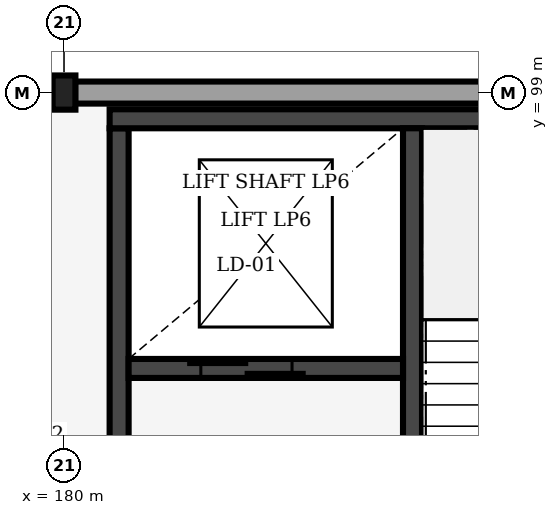
"""IFC4 building model, lengths in metres.
Left out: names, types, materials, properties, quantities, classifications, styles, units other than length and angle.
Written with IfcOpenShell. Run it as: python <this file> out.ifc"""

import sys

from ifc_helpers import new_model, si_unit, direction, frame, frame_2d, origin, origin_2d, place, context, subcontext, project, spatial, rectangle, i_section, extrude, element, fill, save


model = new_model("IFC4")
c1 = context("Model", 3, precision=1e-05, world=origin(), true_north=direction((0.0, 1.0)))
c2 = subcontext(c1, "Body", "Model", "MODEL_VIEW")
j1 = project(units=[si_unit("LENGTHUNIT", "METRE"), si_unit("PLANEANGLEUNIT", "RADIAN")], contexts=[c1])
p1 = place(None, origin())
s1 = spatial("IfcSite", under=j1, at=p1, CompositionType="ELEMENT")
p2 = place(p1, origin())
s2 = spatial("IfcBuilding", under=s1, at=p2, CompositionType="ELEMENT")
p3 = place(p2, frame((0.0, 0.0, 18.0)))
s3 = spatial("IfcBuildingStorey", under=s2, at=p3, CompositionType="ELEMENT", Elevation=18.0)
p4 = place(p3, frame((180.0, 99.0, 0.0), z_axis=(0.0, 0.0, 1.0), x_axis=(1.0, 0.0, 0.0)))
e1 = element("IfcColumn", 1, at=p4, inside=s3, PredefinedType="COLUMN", context=c2, shape_type="SweptSolid", body=[
    extrude(i_section(OverallWidth=0.3, OverallDepth=0.45, WebThickness=0.014, FlangeThickness=0.026, FilletRadius=0.027, at=origin_2d()), origin(), (0.0, 0.0, 1.0), 4.8),
])
p5 = place(p3, frame((180.145, 99.0, 0.0), z_axis=(0.0, 0.0, 1.0), x_axis=(1.0, 0.0, 0.0)))
e2 = element("IfcWall", 2, at=p5, inside=s3, PredefinedType="SOLIDWALL", context=c2, shape_type="SweptSolid", body=[
    extrude(rectangle(XDim=11.71, YDim=0.29, at=frame_2d((5.855, 0.0))), origin(), (0.0, 0.0, 1.0), 3.65),
])
p6 = place(p3, frame((180.725, 90.47, 0.0), z_axis=(0.0, 0.0, 1.0), x_axis=(0.0, 1.0, 0.0)))
e3 = element("IfcWall", 3, at=p6, inside=s3, PredefinedType="SHEAR", context=c2, shape_type="SweptSolid", body=[
    extrude(rectangle(XDim=8.06, YDim=0.25, at=frame_2d((4.03, 0.0))), origin(), (0.0, 0.0, 1.0), 4.44),
])
p7 = place(p6, frame((1.15, 0.0, 0.0)))
e4 = element("IfcOpeningElement", 4, at=p7, cuts=e3, PredefinedType="OPENING", context=c2, shape_type="SweptSolid", body=[
    extrude(rectangle(XDim=1.6, YDim=2.2, at=frame_2d((0.8, 1.1))), frame((0.0, 0.135, 0.0), z_axis=(0.0, -1.0, 0.0), x_axis=(1.0, 0.0, 0.0)), (0.0, 0.0, 1.0), 0.27),
])
p8 = place(p3, frame((180.6, 98.655, 0.0), z_axis=(0.0, 0.0, 1.0), x_axis=(1.0, 0.0, 0.0)))
e5 = element("IfcWall", 5, at=p8, inside=s3, PredefinedType="SHEAR", context=c2, shape_type="SweptSolid", body=[
    extrude(rectangle(XDim=7.8, YDim=0.25, at=frame_2d((3.9, 0.0))), origin(), (0.0, 0.0, 1.0), 4.44),
])
p9 = place(p3, frame((184.585, 90.47, 0.0), z_axis=(0.0, 0.0, 1.0), x_axis=(0.0, 1.0, 0.0)))
e6 = element("IfcWall", 6, at=p9, inside=s3, PredefinedType="SHEAR", context=c2, shape_type="SweptSolid", body=[
    extrude(rectangle(XDim=8.06, YDim=0.25, at=frame_2d((4.03, 0.0))), origin(), (0.0, 0.0, 1.0), 4.44),
])
p10 = place(p9, frame((0.25, 0.0, 0.0)))
e7 = element("IfcOpeningElement", 7, at=p10, cuts=e6, PredefinedType="OPENING", context=c2, shape_type="SweptSolid", body=[
    extrude(rectangle(XDim=1.15, YDim=2.15, at=frame_2d((0.575, 1.075))), frame((0.0, 0.135, 0.0), z_axis=(0.0, -1.0, 0.0), x_axis=(1.0, 0.0, 0.0)), (0.0, 0.0, 1.0), 0.27),
])
p11 = place(p3, frame((180.85, 95.37, 0.0), z_axis=(0.0, 0.0, 1.0), x_axis=(1.0, 0.0, 0.0)))
e8 = element("IfcWall", 8, at=p11, inside=s3, PredefinedType="SHEAR", context=c2, shape_type="SweptSolid", body=[
    extrude(rectangle(XDim=3.61, YDim=0.25, at=frame_2d((1.805, 0.0))), origin(), (0.0, 0.0, 1.0), 4.44),
])
p12 = place(p11, frame((0.95, 0.0, 0.0)))
e9 = element("IfcOpeningElement", 9, at=p12, cuts=e8, PredefinedType="OPENING", context=c2, shape_type="SweptSolid", body=[
    extrude(rectangle(XDim=1.2, YDim=2.2, at=frame_2d((0.6, 1.1))), frame((0.0, 0.135, 0.0), z_axis=(0.0, -1.0, 0.0), x_axis=(1.0, 0.0, 0.0)), (0.0, 0.0, 1.0), 0.27),
])
p13 = place(p12, origin())
e10 = element("IfcDoor", 10, at=p13, inside=s3, OperationType="DOUBLE_DOOR_SLIDING", PredefinedType="DOOR", context=c2, shape_type="SweptSolid", body=[
    extrude(rectangle(XDim=1.2, YDim=2.2, at=frame_2d((0.6, 1.1))), frame((0.0, 0.025, 0.0), z_axis=(0.0, -1.0, 0.0), x_axis=(1.0, 0.0, 0.0)), (0.0, 0.0, 1.0), 0.05),
])
fill(e9, e10)
save(model, sys.argv[1])
